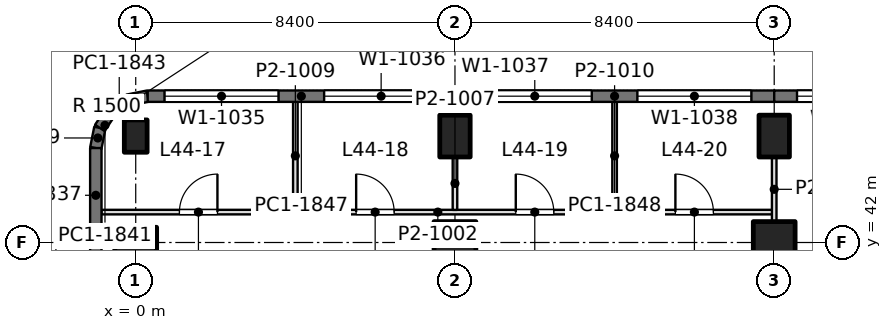
"""IFC4 building model, lengths in metres.
Left out: names, types, materials, properties, quantities, classifications, styles, units other than length and angle.
Written with IfcOpenShell. Run it as: python <this file> out.ifc"""

import sys

from ifc_helpers import new_model, si_unit, direction, frame, frame_2d, origin, origin_2d, place, context, subcontext, project, spatial, rectangle, extrude, element, fill, save


model = new_model("IFC4")
c1 = context("Model", 3, precision=1e-05, world=origin(), true_north=direction((0.0, 1.0)))
c2 = subcontext(c1, "Body", "Model", "MODEL_VIEW")
j1 = project(units=[si_unit("LENGTHUNIT", "METRE"), si_unit("PLANEANGLEUNIT", "RADIAN")], contexts=[c1])
p1 = place(None, origin())
s1 = spatial("IfcSite", under=j1, at=p1, CompositionType="ELEMENT")
p2 = place(p1, origin())
s2 = spatial("IfcBuilding", under=s1, at=p2, CompositionType="ELEMENT")
p3 = place(p2, frame((0.0, 0.0, 194.4)))
s3 = spatial("IfcBuildingStorey", under=s2, at=p3, CompositionType="ELEMENT", Elevation=194.4)
p4 = place(p3, frame((0.0, 42.0, 0.0), z_axis=(0.0, 0.0, 1.0), x_axis=(0.0, 1.0, 0.0)))
e1 = element("IfcColumn", 1, at=p4, inside=s3, PredefinedType="COLUMN", context=c2, shape_type="SweptSolid", body=[
    extrude(rectangle(XDim=0.8, YDim=1.1, at=origin_2d()), origin(), (0.0, 0.0, 1.0), 4.2),
])
p5 = place(p3, frame((0.0, 44.8, 0.0), z_axis=(0.0, 0.0, 1.0), x_axis=(1.0, 0.0, 0.0)))
e2 = element("IfcColumn", 2, at=p5, inside=s3, PredefinedType="COLUMN", context=c2, shape_type="SweptSolid", body=[
    extrude(rectangle(XDim=0.6, YDim=0.85, at=origin_2d()), origin(), (0.0, 0.0, 1.0), 4.2),
])
p6 = place(p3, frame((8.4, 42.0, 0.0), z_axis=(0.0, 0.0, 1.0), x_axis=(1.0, 0.0, 0.0)))
e3 = element("IfcColumn", 3, at=p6, inside=s3, PredefinedType="COLUMN", context=c2, shape_type="SweptSolid", body=[
    extrude(rectangle(XDim=1.1, YDim=1.1, at=origin_2d()), origin(), (0.0, 0.0, 1.0), 4.2),
])
p7 = place(p3, frame((8.4, 44.8, 0.0), z_axis=(0.0, 0.0, 1.0), x_axis=(1.0, 0.0, 0.0)))
e4 = element("IfcColumn", 4, at=p7, inside=s3, PredefinedType="COLUMN", context=c2, shape_type="SweptSolid", body=[
    extrude(rectangle(XDim=0.8, YDim=1.1, at=origin_2d()), origin(), (0.0, 0.0, 1.0), 4.2),
])
p8 = place(p3, frame((16.8, 42.0, 0.0), z_axis=(0.0, 0.0, 1.0), x_axis=(1.0, 0.0, 0.0)))
e5 = element("IfcColumn", 5, at=p8, inside=s3, PredefinedType="COLUMN", context=c2, shape_type="SweptSolid", body=[
    extrude(rectangle(XDim=1.1, YDim=1.1, at=origin_2d()), origin(), (0.0, 0.0, 1.0), 4.2),
])
p9 = place(p3, frame((16.8, 44.8, 0.0), z_axis=(0.0, 0.0, 1.0), x_axis=(1.0, 0.0, 0.0)))
e6 = element("IfcColumn", 6, at=p9, inside=s3, PredefinedType="COLUMN", context=c2, shape_type="SweptSolid", body=[
    extrude(rectangle(XDim=0.8, YDim=1.1, at=origin_2d()), origin(), (0.0, 0.0, 1.0), 4.2),
])
p10 = place(p3, frame((-1.05, 37.725, 0.0), z_axis=(0.0, 0.0, 1.0), x_axis=(0.0, 1.0, 0.0)))
e7 = element("IfcWall", 7, at=p10, inside=s3, PredefinedType="SOLIDWALL", context=c2, shape_type="SweptSolid", body=[
    extrude(rectangle(XDim=4.275, YDim=0.3, at=frame_2d((2.137, 0.0))), origin(), (0.0, 0.0, 1.0), 4.05),
])
p11 = place(p10, frame((0.938, 0.0, 0.9)))
e8 = element("IfcOpeningElement", 8, at=p11, cuts=e7, PredefinedType="OPENING", context=c2, shape_type="SweptSolid", body=[
    extrude(rectangle(XDim=2.4, YDim=1.9, at=frame_2d((1.2, 0.95))), frame((0.0, 0.16, 0.0), z_axis=(0.0, -1.0, 0.0), x_axis=(1.0, 0.0, 0.0)), (0.0, 0.0, 1.0), 0.32),
])
p12 = place(p3, frame((-1.05, 42.0, 0.0), z_axis=(0.0, 0.0, 1.0), x_axis=(0.0, 1.0, 0.0)))
e9 = element("IfcWall", 9, at=p12, inside=s3, PredefinedType="SOLIDWALL", context=c2, shape_type="SweptSolid", body=[
    extrude(rectangle(XDim=2.485, YDim=0.3, at=frame_2d((1.243, 0.0))), origin(), (0.0, 0.0, 1.0), 4.05),
])
p13 = place(p3, frame((-1.05, 44.485, 0.0), z_axis=(0.0, 0.0, 1.0), x_axis=(0.195073962632, 0.980788534345, 0.0)))
e10 = element("IfcWall", 10, at=p13, inside=s3, PredefinedType="SOLIDWALL", context=c2, shape_type="SweptSolid", body=[
    extrude(rectangle(XDim=0.541, YDim=0.3, at=frame_2d((0.271, 0.0))), origin(), (0.0, 0.0, 1.0), 4.05),
])
p14 = place(p3, frame((-0.945, 45.015, 0.0), z_axis=(0.0, 0.0, 1.0), x_axis=(0.55534295404, 0.831621430339, 0.0)))
e11 = element("IfcWall", 11, at=p14, inside=s3, PredefinedType="SOLIDWALL", context=c2, shape_type="SweptSolid", body=[
    extrude(rectangle(XDim=0.526, YDim=0.3, at=frame_2d((0.263, 0.0))), origin(), (0.0, 0.0, 1.0), 4.05),
])
p15 = place(p3, frame((-0.653, 45.453, 0.0), z_axis=(0.0, 0.0, 1.0), x_axis=(0.831692711774, 0.555236195849, 0.0)))
e12 = element("IfcWall", 12, at=p15, inside=s3, PredefinedType="SOLIDWALL", context=c2, shape_type="SweptSolid", body=[
    extrude(rectangle(XDim=0.525, YDim=0.3, at=frame_2d((0.263, 0.0))), origin(), (0.0, 0.0, 1.0), 4.05),
])
p16 = place(p3, frame((-0.216, 45.744, 0.0), z_axis=(0.0, 0.0, 1.0), x_axis=(0.980702050465, 0.1955082817, 0.0)))
e13 = element("IfcWall", 13, at=p16, inside=s3, PredefinedType="SOLIDWALL", context=c2, shape_type="SweptSolid", body=[
    extrude(rectangle(XDim=0.541, YDim=0.3, at=frame_2d((0.271, 0.0))), origin(), (0.0, 0.0, 1.0), 4.05),
])
p17 = place(p3, frame((0.315, 45.85, 0.0), z_axis=(0.0, 0.0, 1.0), x_axis=(1.0, 0.0, 0.0)))
e14 = element("IfcWall", 14, at=p17, inside=s3, PredefinedType="SOLIDWALL", context=c2, shape_type="SweptSolid", body=[
    extrude(rectangle(XDim=8.085, YDim=0.3, at=frame_2d((4.042, 0.0))), origin(), (0.0, 0.0, 1.0), 4.05),
])
p18 = place(p17, frame((0.443, 0.0, 0.9)))
e15 = element("IfcOpeningElement", 15, at=p18, cuts=e14, PredefinedType="OPENING", context=c2, shape_type="SweptSolid", body=[
    extrude(rectangle(XDim=3.0, YDim=1.9, at=frame_2d((1.5, 0.95))), frame((0.0, 0.16, 0.0), z_axis=(0.0, -1.0, 0.0), x_axis=(1.0, 0.0, 0.0)), (0.0, 0.0, 1.0), 0.32),
])
p19 = place(p17, frame((4.643, 0.0, 0.9)))
e16 = element("IfcOpeningElement", 16, at=p19, cuts=e14, PredefinedType="OPENING", context=c2, shape_type="SweptSolid", body=[
    extrude(rectangle(XDim=3.0, YDim=1.9, at=frame_2d((1.5, 0.95))), frame((0.0, 0.16, 0.0), z_axis=(0.0, -1.0, 0.0), x_axis=(1.0, 0.0, 0.0)), (0.0, 0.0, 1.0), 0.32),
])
p20 = place(p3, frame((8.4, 45.85, 0.0), z_axis=(0.0, 0.0, 1.0), x_axis=(1.0, 0.0, 0.0)))
e17 = element("IfcWall", 17, at=p20, inside=s3, PredefinedType="SOLIDWALL", context=c2, shape_type="SweptSolid", body=[
    extrude(rectangle(XDim=8.4, YDim=0.3, at=frame_2d((4.2, 0.0))), origin(), (0.0, 0.0, 1.0), 4.05),
])
p21 = place(p20, frame((0.6, 0.0, 0.9)))
e18 = element("IfcOpeningElement", 18, at=p21, cuts=e17, PredefinedType="OPENING", context=c2, shape_type="SweptSolid", body=[
    extrude(rectangle(XDim=3.0, YDim=1.9, at=frame_2d((1.5, 0.95))), frame((0.0, 0.16, 0.0), z_axis=(0.0, -1.0, 0.0), x_axis=(1.0, 0.0, 0.0)), (0.0, 0.0, 1.0), 0.32),
])
p22 = place(p20, frame((4.8, 0.0, 0.9)))
e19 = element("IfcOpeningElement", 19, at=p22, cuts=e17, PredefinedType="OPENING", context=c2, shape_type="SweptSolid", body=[
    extrude(rectangle(XDim=3.0, YDim=1.9, at=frame_2d((1.5, 0.95))), frame((0.0, 0.16, 0.0), z_axis=(0.0, -1.0, 0.0), x_axis=(1.0, 0.0, 0.0)), (0.0, 0.0, 1.0), 0.32),
])
p23 = place(p3, frame((16.8, 45.85, 0.0), z_axis=(0.0, 0.0, 1.0), x_axis=(1.0, 0.0, 0.0)))
e20 = element("IfcWall", 20, at=p23, inside=s3, PredefinedType="SOLIDWALL", context=c2, shape_type="SweptSolid", body=[
    extrude(rectangle(XDim=8.4, YDim=0.3, at=frame_2d((4.2, 0.0))), origin(), (0.0, 0.0, 1.0), 4.05),
])
p24 = place(p23, frame((0.6, 0.0, 0.9)))
e21 = element("IfcOpeningElement", 21, at=p24, cuts=e20, PredefinedType="OPENING", context=c2, shape_type="SweptSolid", body=[
    extrude(rectangle(XDim=3.0, YDim=1.9, at=frame_2d((1.5, 0.95))), frame((0.0, 0.16, 0.0), z_axis=(0.0, -1.0, 0.0), x_axis=(1.0, 0.0, 0.0)), (0.0, 0.0, 1.0), 0.32),
])
p25 = place(p23, frame((4.8, 0.0, 0.9)))
e22 = element("IfcOpeningElement", 22, at=p25, cuts=e20, PredefinedType="OPENING", context=c2, shape_type="SweptSolid", body=[
    extrude(rectangle(XDim=3.0, YDim=1.9, at=frame_2d((1.5, 0.95))), frame((0.0, 0.16, 0.0), z_axis=(0.0, -1.0, 0.0), x_axis=(1.0, 0.0, 0.0)), (0.0, 0.0, 1.0), 0.32),
])
p26 = place(p3, frame((-0.902, 42.8, 0.0), z_axis=(0.0, 0.0, 1.0), x_axis=(1.0, 0.0, 0.0)))
e23 = element("IfcWall", 23, at=p26, inside=s3, PredefinedType="PARTITIONING", context=c2, shape_type="SweptSolid", body=[
    extrude(rectangle(XDim=17.702, YDim=0.12, at=frame_2d((8.851, 0.0))), origin(), (0.0, 0.0, 1.0), 3.56),
])
p27 = place(p26, frame((2.052, 0.0, 0.0)))
e24 = element("IfcOpeningElement", 24, at=p27, cuts=e23, PredefinedType="OPENING", context=c2, shape_type="SweptSolid", body=[
    extrude(rectangle(XDim=1.0, YDim=2.4, at=frame_2d((0.5, 1.2))), frame((0.0, 0.07, 0.0), z_axis=(0.0, -1.0, 0.0), x_axis=(1.0, 0.0, 0.0)), (0.0, 0.0, 1.0), 0.14),
])
p28 = place(p26, frame((6.702, 0.0, 0.0)))
e25 = element("IfcOpeningElement", 25, at=p28, cuts=e23, PredefinedType="OPENING", context=c2, shape_type="SweptSolid", body=[
    extrude(rectangle(XDim=1.0, YDim=2.4, at=frame_2d((0.5, 1.2))), frame((0.0, 0.07, 0.0), z_axis=(0.0, -1.0, 0.0), x_axis=(1.0, 0.0, 0.0)), (0.0, 0.0, 1.0), 0.14),
])
p29 = place(p26, frame((10.902, 0.0, 0.0)))
e26 = element("IfcOpeningElement", 26, at=p29, cuts=e23, PredefinedType="OPENING", context=c2, shape_type="SweptSolid", body=[
    extrude(rectangle(XDim=1.0, YDim=2.4, at=frame_2d((0.5, 1.2))), frame((0.0, 0.07, 0.0), z_axis=(0.0, -1.0, 0.0), x_axis=(1.0, 0.0, 0.0)), (0.0, 0.0, 1.0), 0.14),
])
p30 = place(p26, frame((15.102, 0.0, 0.0)))
e27 = element("IfcOpeningElement", 27, at=p30, cuts=e23, PredefinedType="OPENING", context=c2, shape_type="SweptSolid", body=[
    extrude(rectangle(XDim=1.0, YDim=2.4, at=frame_2d((0.5, 1.2))), frame((0.0, 0.07, 0.0), z_axis=(0.0, -1.0, 0.0), x_axis=(1.0, 0.0, 0.0)), (0.0, 0.0, 1.0), 0.14),
])
p31 = place(p3, frame((4.2, 42.858, 0.0), z_axis=(0.0, 0.0, 1.0), x_axis=(0.0, 1.0, 0.0)))
e28 = element("IfcWall", 28, at=p31, inside=s3, PredefinedType="PARTITIONING", context=c2, shape_type="SweptSolid", body=[
    extrude(rectangle(XDim=2.844, YDim=0.12, at=frame_2d((1.422, 0.0))), origin(), (0.0, 0.0, 1.0), 3.56),
])
p32 = place(p3, frame((8.4, 42.858, 0.0), z_axis=(0.0, 0.0, 1.0), x_axis=(0.0, 1.0, 0.0)))
e29 = element("IfcWall", 29, at=p32, inside=s3, PredefinedType="PARTITIONING", context=c2, shape_type="SweptSolid", body=[
    extrude(rectangle(XDim=1.393, YDim=0.12, at=frame_2d((0.697, 0.0))), origin(), (0.0, 0.0, 1.0), 3.69),
])
p33 = place(p3, frame((12.6, 42.858, 0.0), z_axis=(0.0, 0.0, 1.0), x_axis=(0.0, 1.0, 0.0)))
e30 = element("IfcWall", 30, at=p33, inside=s3, PredefinedType="PARTITIONING", context=c2, shape_type="SweptSolid", body=[
    extrude(rectangle(XDim=2.844, YDim=0.12, at=frame_2d((1.422, 0.0))), origin(), (0.0, 0.0, 1.0), 3.56),
])
p34 = place(p3, frame((16.8, 42.548, 0.0), z_axis=(0.0, 0.0, 1.0), x_axis=(0.0, 1.0, 0.0)))
e31 = element("IfcWall", 31, at=p34, inside=s3, PredefinedType="PARTITIONING", context=c2, shape_type="SweptSolid", body=[
    extrude(rectangle(XDim=1.703, YDim=0.12, at=frame_2d((0.852, 0.0))), origin(), (0.0, 0.0, 1.0), 3.69),
])
p35 = place(p18, origin())
e32 = element("IfcWindow", 32, at=p35, inside=s3, PartitioningType="SINGLE_PANEL", PredefinedType="WINDOW", context=c2, shape_type="SweptSolid", body=[
    extrude(rectangle(XDim=3.0, YDim=1.9, at=frame_2d((1.5, 0.95))), frame((0.0, 0.03, 0.0), z_axis=(0.0, -1.0, 0.0), x_axis=(1.0, 0.0, 0.0)), (0.0, 0.0, 1.0), 0.06),
])
fill(e15, e32)
p36 = place(p19, origin())
e33 = element("IfcWindow", 33, at=p36, inside=s3, PartitioningType="SINGLE_PANEL", PredefinedType="WINDOW", context=c2, shape_type="SweptSolid", body=[
    extrude(rectangle(XDim=3.0, YDim=1.9, at=frame_2d((1.5, 0.95))), frame((0.0, 0.03, 0.0), z_axis=(0.0, -1.0, 0.0), x_axis=(1.0, 0.0, 0.0)), (0.0, 0.0, 1.0), 0.06),
])
fill(e16, e33)
p37 = place(p21, origin())
e34 = element("IfcWindow", 34, at=p37, inside=s3, PartitioningType="SINGLE_PANEL", PredefinedType="WINDOW", context=c2, shape_type="SweptSolid", body=[
    extrude(rectangle(XDim=3.0, YDim=1.9, at=frame_2d((1.5, 0.95))), frame((0.0, 0.03, 0.0), z_axis=(0.0, -1.0, 0.0), x_axis=(1.0, 0.0, 0.0)), (0.0, 0.0, 1.0), 0.06),
])
fill(e18, e34)
p38 = place(p22, origin())
e35 = element("IfcWindow", 35, at=p38, inside=s3, PartitioningType="SINGLE_PANEL", PredefinedType="WINDOW", context=c2, shape_type="SweptSolid", body=[
    extrude(rectangle(XDim=3.0, YDim=1.9, at=frame_2d((1.5, 0.95))), frame((0.0, 0.03, 0.0), z_axis=(0.0, -1.0, 0.0), x_axis=(1.0, 0.0, 0.0)), (0.0, 0.0, 1.0), 0.06),
])
fill(e19, e35)
p39 = place(p24, origin())
e36 = element("IfcWindow", 36, at=p39, inside=s3, PartitioningType="SINGLE_PANEL", PredefinedType="WINDOW", context=c2, shape_type="SweptSolid", body=[
    extrude(rectangle(XDim=3.0, YDim=1.9, at=frame_2d((1.5, 0.95))), frame((0.0, 0.03, 0.0), z_axis=(0.0, -1.0, 0.0), x_axis=(1.0, 0.0, 0.0)), (0.0, 0.0, 1.0), 0.06),
])
fill(e21, e36)
p40 = place(p27, origin())
e37 = element("IfcDoor", 37, at=p40, inside=s3, OperationType="SINGLE_SWING_RIGHT", PredefinedType="DOOR", context=c2, shape_type="SweptSolid", body=[
    extrude(rectangle(XDim=1.0, YDim=2.4, at=frame_2d((0.5, 1.2))), frame((0.0, 0.025, 0.0), z_axis=(0.0, -1.0, 0.0), x_axis=(1.0, 0.0, 0.0)), (0.0, 0.0, 1.0), 0.05),
])
fill(e24, e37)
p41 = place(p28, origin())
e38 = element("IfcDoor", 38, at=p41, inside=s3, OperationType="SINGLE_SWING_LEFT", PredefinedType="DOOR", context=c2, shape_type="SweptSolid", body=[
    extrude(rectangle(XDim=1.0, YDim=2.4, at=frame_2d((0.5, 1.2))), frame((0.0, 0.025, 0.0), z_axis=(0.0, -1.0, 0.0), x_axis=(1.0, 0.0, 0.0)), (0.0, 0.0, 1.0), 0.05),
])
fill(e25, e38)
p42 = place(p29, origin())
e39 = element("IfcDoor", 39, at=p42, inside=s3, OperationType="SINGLE_SWING_LEFT", PredefinedType="DOOR", context=c2, shape_type="SweptSolid", body=[
    extrude(rectangle(XDim=1.0, YDim=2.4, at=frame_2d((0.5, 1.2))), frame((0.0, 0.025, 0.0), z_axis=(0.0, -1.0, 0.0), x_axis=(1.0, 0.0, 0.0)), (0.0, 0.0, 1.0), 0.05),
])
fill(e26, e39)
p43 = place(p30, origin())
e40 = element("IfcDoor", 40, at=p43, inside=s3, OperationType="SINGLE_SWING_LEFT", PredefinedType="DOOR", context=c2, shape_type="SweptSolid", body=[
    extrude(rectangle(XDim=1.0, YDim=2.4, at=frame_2d((0.5, 1.2))), frame((0.0, 0.025, 0.0), z_axis=(0.0, -1.0, 0.0), x_axis=(1.0, 0.0, 0.0)), (0.0, 0.0, 1.0), 0.05),
])
fill(e27, e40)
save(model, sys.argv[1])
